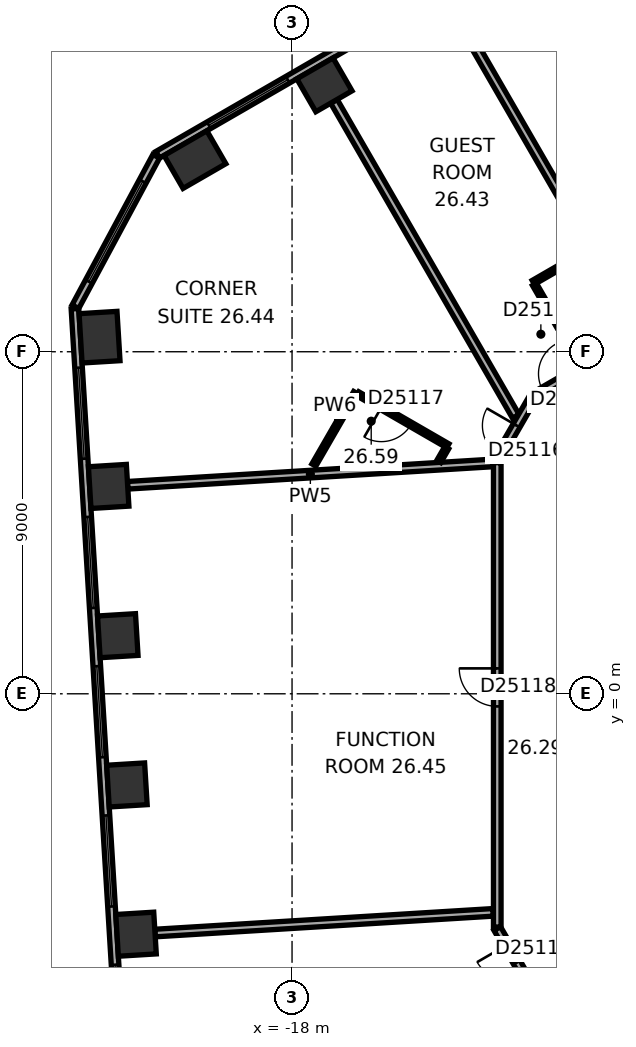
"""IFC4 building model, lengths in metres.
Left out: names, types, materials, properties, quantities, classifications, styles, units other than length and angle.
Written with IfcOpenShell. Run it as: python <this file> out.ifc"""

import sys

from ifc_helpers import new_model, si_unit, direction, frame, frame_2d, origin, origin_2d, place, context, subcontext, project, spatial, rectangle, extrude, element, fill, save


model = new_model("IFC4")
c1 = context("Model", 3, precision=1e-05, world=origin(), true_north=direction((0.0, 1.0)))
c2 = subcontext(c1, "Body", "Model", "MODEL_VIEW")
j1 = project(units=[si_unit("LENGTHUNIT", "METRE"), si_unit("PLANEANGLEUNIT", "RADIAN")], contexts=[c1])
p1 = place(None, origin())
s1 = spatial("IfcSite", under=j1, at=p1, CompositionType="ELEMENT")
p2 = place(p1, origin())
s2 = spatial("IfcBuilding", under=s1, at=p2, CompositionType="ELEMENT")
p3 = place(p2, frame((0.0, 0.0, 110.0)))
s3 = spatial("IfcBuildingStorey", under=s2, at=p3, CompositionType="ELEMENT", Elevation=110.0)
p4 = place(p3, frame((-17.148, 16.023, 0.0), z_axis=(0.0, 0.0, 1.0), x_axis=(-0.866025403784, -0.5, 0.0)))
e1 = element("IfcColumn", 1, at=p4, inside=s3, PredefinedType="COLUMN", context=c2, shape_type="SweptSolid", body=[
    extrude(rectangle(XDim=1.1, YDim=1.0, at=origin_2d()), origin(), (0.0, 0.0, 1.0), 3.3),
])
for number, where, z_axis, x_axis in (
    (2, (-20.555, 14.055, 0.0), (0.0, 0.0, 1.0), (-0.866, -0.5, 0.0)),
    (3, (-23.066, 9.383, 0.0), (0.0, 0.0, 1.0), (0.061, -0.998, 0.0)),
):
    element("IfcColumn", number, at=place(p3, frame(where, z_axis=z_axis, x_axis=x_axis)), inside=s3, PredefinedType="COLUMN", context=c2, shape_type="SweptSolid", body=[
        extrude(rectangle(XDim=1.3, YDim=1.0, at=origin_2d()), origin(), (0.0, 0.0, 1.0), 3.3),
    ])
for number, where, z_axis, x_axis in (
    (4, (-22.826, 5.456, 0.0), (0.0, 0.0, 1.0), (0.061, -0.998, 0.0)),
    (5, (-22.585, 1.529, 0.0), (0.0, 0.0, 1.0), (0.061, -0.998, 0.0)),
    (6, (-22.345, -2.399, 0.0), (0.0, 0.0, 1.0), (0.061, -0.998, 0.0)),
    (7, (-22.105, -6.326, 0.0), (0.0, 0.0, 1.0), (0.061, -0.998, 0.0)),
):
    element("IfcColumn", number, at=place(p3, frame(where, z_axis=z_axis, x_axis=x_axis)), inside=s3, PredefinedType="COLUMN", context=c2, shape_type="SweptSolid", body=[
        extrude(rectangle(XDim=1.1, YDim=1.0, at=origin_2d()), origin(), (0.0, 0.0, 1.0), 3.3),
    ])
p5 = place(p3, frame((-3.136, 24.805, 0.0), z_axis=(0.0, 0.0, 1.0), x_axis=(-0.866028291626, -0.499994998079, 0.0)))
e8 = element("IfcWall", 8, at=p5, inside=s3, PredefinedType="STANDARD", context=c2, shape_type="SweptSolid", body=[
    extrude(rectangle(XDim=21.246, YDim=0.2, at=frame_2d((10.623, 0.0))), origin(), (0.0, 0.0, 1.0), 3.3),
])
p6 = place(p5, frame((1.555, 0.0, 0.8)))
e9 = element("IfcOpeningElement", 9, at=p6, cuts=e8, PredefinedType="OPENING", context=c2, shape_type="SweptSolid", body=[
    extrude(rectangle(XDim=2.4, YDim=1.7, at=frame_2d((1.2, 0.85))), frame((0.0, 0.11, 0.0), z_axis=(0.0, -1.0, 0.0), x_axis=(1.0, 0.0, 0.0)), (0.0, 0.0, 1.0), 0.22),
])
p7 = place(p5, frame((5.489, 0.0, 0.8)))
e10 = element("IfcOpeningElement", 10, at=p7, cuts=e8, PredefinedType="OPENING", context=c2, shape_type="SweptSolid", body=[
    extrude(rectangle(XDim=2.4, YDim=1.7, at=frame_2d((1.2, 0.85))), frame((0.0, 0.11, 0.0), z_axis=(0.0, -1.0, 0.0), x_axis=(1.0, 0.0, 0.0)), (0.0, 0.0, 1.0), 0.22),
])
p8 = place(p5, frame((9.424, 0.0, 0.8)))
e11 = element("IfcOpeningElement", 11, at=p8, cuts=e8, PredefinedType="OPENING", context=c2, shape_type="SweptSolid", body=[
    extrude(rectangle(XDim=2.4, YDim=1.7, at=frame_2d((1.2, 0.85))), frame((0.0, 0.11, 0.0), z_axis=(0.0, -1.0, 0.0), x_axis=(1.0, 0.0, 0.0)), (0.0, 0.0, 1.0), 0.22),
])
p9 = place(p5, frame((13.358, 0.0, 0.8)))
e12 = element("IfcOpeningElement", 12, at=p9, cuts=e8, PredefinedType="OPENING", context=c2, shape_type="SweptSolid", body=[
    extrude(rectangle(XDim=2.4, YDim=1.7, at=frame_2d((1.2, 0.85))), frame((0.0, 0.11, 0.0), z_axis=(0.0, -1.0, 0.0), x_axis=(1.0, 0.0, 0.0)), (0.0, 0.0, 1.0), 0.22),
])
p10 = place(p5, frame((17.293, 0.0, 0.8)))
e13 = element("IfcOpeningElement", 13, at=p10, cuts=e8, PredefinedType="OPENING", context=c2, shape_type="SweptSolid", body=[
    extrude(rectangle(XDim=2.4, YDim=1.7, at=frame_2d((1.2, 0.85))), frame((0.0, 0.11, 0.0), z_axis=(0.0, -1.0, 0.0), x_axis=(1.0, 0.0, 0.0)), (0.0, 0.0, 1.0), 0.22),
])
p11 = place(p3, frame((-21.574, 14.143, 0.0), z_axis=(0.0, 0.0, 1.0), x_axis=(-0.473292949472, -0.880905093628, 0.0)))
e14 = element("IfcWall", 14, at=p11, inside=s3, PredefinedType="STANDARD", context=c2, shape_type="SweptSolid", body=[
    extrude(rectangle(XDim=4.494, YDim=0.2, at=frame_2d((2.247, 0.0))), origin(), (0.0, 0.0, 1.0), 3.3),
])
p12 = place(p11, frame((0.747, 0.0, 0.8)))
e15 = element("IfcOpeningElement", 15, at=p12, cuts=e14, PredefinedType="OPENING", context=c2, shape_type="SweptSolid", body=[
    extrude(rectangle(XDim=3.0, YDim=1.7, at=frame_2d((1.5, 0.85))), frame((0.0, 0.11, 0.0), z_axis=(0.0, -1.0, 0.0), x_axis=(1.0, 0.0, 0.0)), (0.0, 0.0, 1.0), 0.22),
])
p13 = place(p3, frame((-23.713, 10.131, 0.0), z_axis=(0.0, 0.0, 1.0), x_axis=(0.061040439785, -0.998135293791, 0.0)))
e16 = element("IfcWall", 16, at=p13, inside=s3, PredefinedType="STANDARD", context=c2, shape_type="SweptSolid", body=[
    extrude(rectangle(XDim=21.246, YDim=0.2, at=frame_2d((10.623, 0.0))), origin(), (0.0, 0.0, 1.0), 3.3),
])
p14 = place(p13, frame((1.553, 0.0, 0.8)))
e17 = element("IfcOpeningElement", 17, at=p14, cuts=e16, PredefinedType="OPENING", context=c2, shape_type="SweptSolid", body=[
    extrude(rectangle(XDim=2.4, YDim=1.7, at=frame_2d((1.2, 0.85))), frame((0.0, 0.11, 0.0), z_axis=(0.0, -1.0, 0.0), x_axis=(1.0, 0.0, 0.0)), (0.0, 0.0, 1.0), 0.22),
])
p15 = place(p13, frame((5.488, 0.0, 0.8)))
e18 = element("IfcOpeningElement", 18, at=p15, cuts=e16, PredefinedType="OPENING", context=c2, shape_type="SweptSolid", body=[
    extrude(rectangle(XDim=2.4, YDim=1.7, at=frame_2d((1.2, 0.85))), frame((0.0, 0.11, 0.0), z_axis=(0.0, -1.0, 0.0), x_axis=(1.0, 0.0, 0.0)), (0.0, 0.0, 1.0), 0.22),
])
p16 = place(p13, frame((9.422, 0.0, 0.8)))
e19 = element("IfcOpeningElement", 19, at=p16, cuts=e16, PredefinedType="OPENING", context=c2, shape_type="SweptSolid", body=[
    extrude(rectangle(XDim=2.4, YDim=1.7, at=frame_2d((1.2, 0.85))), frame((0.0, 0.11, 0.0), z_axis=(0.0, -1.0, 0.0), x_axis=(1.0, 0.0, 0.0)), (0.0, 0.0, 1.0), 0.22),
])
p17 = place(p13, frame((13.357, 0.0, 0.8)))
e20 = element("IfcOpeningElement", 20, at=p17, cuts=e16, PredefinedType="OPENING", context=c2, shape_type="SweptSolid", body=[
    extrude(rectangle(XDim=2.4, YDim=1.7, at=frame_2d((1.2, 0.85))), frame((0.0, 0.11, 0.0), z_axis=(0.0, -1.0, 0.0), x_axis=(1.0, 0.0, 0.0)), (0.0, 0.0, 1.0), 0.22),
])
p18 = place(p13, frame((17.292, 0.0, 0.8)))
e21 = element("IfcOpeningElement", 21, at=p18, cuts=e16, PredefinedType="OPENING", context=c2, shape_type="SweptSolid", body=[
    extrude(rectangle(XDim=2.4, YDim=1.7, at=frame_2d((1.2, 0.85))), frame((0.0, 0.11, 0.0), z_axis=(0.0, -1.0, 0.0), x_axis=(1.0, 0.0, 0.0)), (0.0, 0.0, 1.0), 0.22),
])
p19 = place(p3, frame((-22.327, 5.486, 0.0), z_axis=(0.0, 0.0, 1.0), x_axis=(0.998135194863, 0.061042057435, 0.0)))
e22 = element("IfcWall", 22, at=p19, inside=s3, PredefinedType="PARTITIONING", context=c2, shape_type="SweptSolid", body=[
    extrude(rectangle(XDim=9.635, YDim=0.2, at=frame_2d((4.817, 0.0))), origin(), (0.0, 0.0, 1.0), 3.05),
])
p20 = place(p3, frame((-21.606, -6.295, 0.0), z_axis=(0.0, 0.0, 1.0), x_axis=(0.998134305525, 0.061056597794, 0.0)))
e23 = element("IfcWall", 23, at=p20, inside=s3, PredefinedType="PARTITIONING", context=c2, shape_type="SweptSolid", body=[
    extrude(rectangle(XDim=8.913, YDim=0.2, at=frame_2d((4.457, 0.0))), origin(), (0.0, 0.0, 1.0), 2.6),
])
p21 = place(p3, frame((-17.426, 6.019, 0.0), z_axis=(0.0, 0.0, 1.0), x_axis=(0.50002983664, 0.866008176907, 0.0)))
e24 = element("IfcWall", 24, at=p21, inside=s3, PredefinedType="PARTITIONING", context=c2, shape_type="SweptSolid", body=[
    extrude(rectangle(XDim=2.2, YDim=0.12, at=frame_2d((1.1, 0.0))), origin(), (0.0, 0.0, 1.0), 3.05),
])
p22 = place(p3, frame((-16.898, 15.59, 0.0), z_axis=(0.0, 0.0, 1.0), x_axis=(0.500023458698, -0.866011859475, 0.0)))
e25 = element("IfcWall", 25, at=p22, inside=s3, PredefinedType="PARTITIONING", context=c2, shape_type="SweptSolid", body=[
    extrude(rectangle(XDim=9.572, YDim=0.2, at=frame_2d((4.786, 0.0))), origin(), (0.0, 0.0, 1.0), 3.05),
])
p23 = place(p3, frame((-16.274, 7.895, 0.0), z_axis=(0.0, 0.0, 1.0), x_axis=(0.865997131366, -0.500048966069, 0.0)))
e26 = element("IfcWall", 26, at=p23, inside=s3, PredefinedType="PARTITIONING", context=c2, shape_type="SweptSolid", body=[
    extrude(rectangle(XDim=2.74, YDim=0.12, at=frame_2d((1.37, 0.0))), origin(), (0.0, 0.0, 1.0), 3.05),
])
p24 = place(p23, frame((0.72, 0.0, 0.0)))
e27 = element("IfcOpeningElement", 27, at=p24, cuts=e26, PredefinedType="OPENING", context=c2, shape_type="SweptSolid", body=[
    extrude(rectangle(XDim=0.9, YDim=2.1, at=frame_2d((0.45, 1.05))), frame((0.0, 0.07, 0.0), z_axis=(0.0, -1.0, 0.0), x_axis=(1.0, 0.0, 0.0)), (0.0, 0.0, 1.0), 0.14),
])
p25 = place(p3, frame((-13.931, 6.472, 0.0), z_axis=(0.0, 0.0, 1.0), x_axis=(-0.499739399214, -0.866175809448, 0.0)))
e28 = element("IfcWall", 28, at=p25, inside=s3, PredefinedType="PARTITIONING", context=c2, shape_type="SweptSolid", body=[
    extrude(rectangle(XDim=0.416, YDim=0.12, at=frame_2d((0.208, 0.0))), origin(), (0.0, 0.0, 1.0), 3.05),
])
p26 = place(p3, frame((-12.6, -6.177, 0.0), z_axis=(0.0, 0.0, 1.0), x_axis=(0.500063520245, -0.865988727248, 0.0)))
e29 = element("IfcWall", 29, at=p26, inside=s3, PredefinedType="PARTITIONING", context=c2, shape_type="SweptSolid", body=[
    extrude(rectangle(XDim=1.9, YDim=0.2, at=frame_2d((0.95, 0.0))), origin(), (0.0, 0.0, 1.0), 3.05),
])
p27 = place(p26, frame((0.5, 0.0, 0.0)))
e30 = element("IfcOpeningElement", 30, at=p27, cuts=e29, PredefinedType="OPENING", context=c2, shape_type="SweptSolid", body=[
    extrude(rectangle(XDim=0.9, YDim=2.1, at=frame_2d((0.45, 1.05))), frame((0.0, 0.11, 0.0), z_axis=(0.0, -1.0, 0.0), x_axis=(1.0, 0.0, 0.0)), (0.0, 0.0, 1.0), 0.22),
])
p28 = place(p3, frame((-12.6, 6.081, 0.0), z_axis=(0.0, 0.0, 1.0), x_axis=(0.0, -1.0, 0.0)))
e31 = element("IfcWall", 31, at=p28, inside=s3, PredefinedType="PARTITIONING", context=c2, shape_type="SweptSolid", body=[
    extrude(rectangle(XDim=12.219, YDim=0.2, at=frame_2d((6.109, 0.0))), origin(), (0.0, 0.0, 1.0), 3.05),
])
p29 = place(p28, frame((5.413, 0.0, 0.0)))
e32 = element("IfcOpeningElement", 32, at=p29, cuts=e31, PredefinedType="OPENING", context=c2, shape_type="SweptSolid", body=[
    extrude(rectangle(XDim=1.0, YDim=2.1, at=frame_2d((0.5, 1.05))), frame((0.0, 0.11, 0.0), z_axis=(0.0, -1.0, 0.0), x_axis=(1.0, 0.0, 0.0)), (0.0, 0.0, 1.0), 0.22),
])
p30 = place(p3, frame((-11.65, 7.823, 0.0), z_axis=(0.0, 0.0, 1.0), x_axis=(-0.500063520245, -0.865988727248, 0.0)))
e33 = element("IfcWall", 33, at=p30, inside=s3, PredefinedType="PARTITIONING", context=c2, shape_type="SweptSolid", body=[
    extrude(rectangle(XDim=1.9, YDim=0.2, at=frame_2d((0.95, 0.0))), origin(), (0.0, 0.0, 1.0), 3.05),
])
p31 = place(p30, frame((0.882, 0.0, 0.0)))
e34 = element("IfcOpeningElement", 34, at=p31, cuts=e33, PredefinedType="OPENING", context=c2, shape_type="SweptSolid", body=[
    extrude(rectangle(XDim=0.9, YDim=2.1, at=frame_2d((0.45, 1.05))), frame((0.0, 0.11, 0.0), z_axis=(0.0, -1.0, 0.0), x_axis=(1.0, 0.0, 0.0)), (0.0, 0.0, 1.0), 0.22),
])
p32 = place(p3, frame((-11.651, 10.825, 0.0), z_axis=(0.0, 0.0, 1.0), x_axis=(0.865998477143, 0.500046635412, 0.0)))
e35 = element("IfcWall", 35, at=p32, inside=s3, PredefinedType="PARTITIONING", context=c2, shape_type="SweptSolid", body=[
    extrude(rectangle(XDim=1.673, YDim=0.12, at=frame_2d((0.836, 0.0))), origin(), (0.0, 0.0, 1.0), 3.05),
])
p33 = place(p3, frame((-10.401, 8.66, 0.0), z_axis=(0.0, 0.0, 1.0), x_axis=(-0.500077547548, 0.865980627057, 0.0)))
e36 = element("IfcWall", 36, at=p33, inside=s3, PredefinedType="PARTITIONING", context=c2, shape_type="SweptSolid", body=[
    extrude(rectangle(XDim=2.44, YDim=0.12, at=frame_2d((1.22, 0.0))), origin(), (0.0, 0.0, 1.0), 3.05),
])
p34 = place(p33, frame((0.77, 0.0, 0.0)))
e37 = element("IfcOpeningElement", 37, at=p34, cuts=e36, PredefinedType="OPENING", context=c2, shape_type="SweptSolid", body=[
    extrude(rectangle(XDim=0.9, YDim=2.1, at=frame_2d((0.45, 1.05))), frame((0.0, 0.07, 0.0), z_axis=(0.0, -1.0, 0.0), x_axis=(1.0, 0.0, 0.0)), (0.0, 0.0, 1.0), 0.14),
])
p35 = place(p3, frame((-8.902, 9.41, 0.0), z_axis=(0.0, 0.0, 1.0), x_axis=(-0.866014299198, -0.500019233215, 0.0)))
e38 = element("IfcWall", 38, at=p35, inside=s3, PredefinedType="PARTITIONING", context=c2, shape_type="SweptSolid", body=[
    extrude(rectangle(XDim=3.133, YDim=0.2, at=frame_2d((1.567, 0.0))), origin(), (0.0, 0.0, 1.0), 3.05),
])
p36 = place(p35, frame((1.978, 0.0, 0.0)))
e39 = element("IfcOpeningElement", 39, at=p36, cuts=e38, PredefinedType="OPENING", context=c2, shape_type="SweptSolid", body=[
    extrude(rectangle(XDim=0.9, YDim=2.1, at=frame_2d((0.45, 1.05))), frame((0.0, 0.11, 0.0), z_axis=(0.0, -1.0, 0.0), x_axis=(1.0, 0.0, 0.0)), (0.0, 0.0, 1.0), 0.22),
])
p37 = place(p3, frame((-7.865, 7.814, 0.0), z_axis=(0.0, 0.0, 1.0), x_axis=(-0.500004234368, 0.866022959057, 0.0)))
e40 = element("IfcWall", 40, at=p37, inside=s3, PredefinedType="PARTITIONING", context=c2, shape_type="SweptSolid", body=[
    extrude(rectangle(XDim=11.25, YDim=0.2, at=frame_2d((5.625, 0.0))), origin(), (0.0, 0.0, 1.0), 3.05),
])
p38 = place(p37, frame((0.5, 0.0, 0.0)))
e41 = element("IfcOpeningElement", 41, at=p38, cuts=e40, PredefinedType="OPENING", context=c2, shape_type="SweptSolid", body=[
    extrude(rectangle(XDim=0.9, YDim=2.1, at=frame_2d((0.45, 1.05))), frame((0.0, 0.11, 0.0), z_axis=(0.0, -1.0, 0.0), x_axis=(1.0, 0.0, 0.0)), (0.0, 0.0, 1.0), 0.22),
])
p39 = place(p10, origin())
e42 = element("IfcWindow", 42, at=p39, inside=s3, PartitioningType="SINGLE_PANEL", PredefinedType="WINDOW", context=c2, shape_type="SweptSolid", body=[
    extrude(rectangle(XDim=2.4, YDim=1.7, at=frame_2d((1.2, 0.85))), frame((0.0, 0.03, 0.0), z_axis=(0.0, -1.0, 0.0), x_axis=(1.0, 0.0, 0.0)), (0.0, 0.0, 1.0), 0.06),
])
fill(e13, e42)
p40 = place(p12, origin())
e43 = element("IfcWindow", 43, at=p40, inside=s3, PartitioningType="SINGLE_PANEL", PredefinedType="WINDOW", context=c2, shape_type="SweptSolid", body=[
    extrude(rectangle(XDim=3.0, YDim=1.7, at=frame_2d((1.5, 0.85))), frame((0.0, 0.03, 0.0), z_axis=(0.0, -1.0, 0.0), x_axis=(1.0, 0.0, 0.0)), (0.0, 0.0, 1.0), 0.06),
])
fill(e15, e43)
p41 = place(p14, origin())
e44 = element("IfcWindow", 44, at=p41, inside=s3, PartitioningType="SINGLE_PANEL", PredefinedType="WINDOW", context=c2, shape_type="SweptSolid", body=[
    extrude(rectangle(XDim=2.4, YDim=1.7, at=frame_2d((1.2, 0.85))), frame((0.0, 0.03, 0.0), z_axis=(0.0, -1.0, 0.0), x_axis=(1.0, 0.0, 0.0)), (0.0, 0.0, 1.0), 0.06),
])
fill(e17, e44)
p42 = place(p15, origin())
e45 = element("IfcWindow", 45, at=p42, inside=s3, PartitioningType="SINGLE_PANEL", PredefinedType="WINDOW", context=c2, shape_type="SweptSolid", body=[
    extrude(rectangle(XDim=2.4, YDim=1.7, at=frame_2d((1.2, 0.85))), frame((0.0, 0.03, 0.0), z_axis=(0.0, -1.0, 0.0), x_axis=(1.0, 0.0, 0.0)), (0.0, 0.0, 1.0), 0.06),
])
fill(e18, e45)
p43 = place(p16, origin())
e46 = element("IfcWindow", 46, at=p43, inside=s3, PartitioningType="SINGLE_PANEL", PredefinedType="WINDOW", context=c2, shape_type="SweptSolid", body=[
    extrude(rectangle(XDim=2.4, YDim=1.7, at=frame_2d((1.2, 0.85))), frame((0.0, 0.03, 0.0), z_axis=(0.0, -1.0, 0.0), x_axis=(1.0, 0.0, 0.0)), (0.0, 0.0, 1.0), 0.06),
])
fill(e19, e46)
p44 = place(p17, origin())
e47 = element("IfcWindow", 47, at=p44, inside=s3, PartitioningType="SINGLE_PANEL", PredefinedType="WINDOW", context=c2, shape_type="SweptSolid", body=[
    extrude(rectangle(XDim=2.4, YDim=1.7, at=frame_2d((1.2, 0.85))), frame((0.0, 0.03, 0.0), z_axis=(0.0, -1.0, 0.0), x_axis=(1.0, 0.0, 0.0)), (0.0, 0.0, 1.0), 0.06),
])
fill(e20, e47)
p45 = place(p18, origin())
e48 = element("IfcWindow", 48, at=p45, inside=s3, PartitioningType="SINGLE_PANEL", PredefinedType="WINDOW", context=c2, shape_type="SweptSolid", body=[
    extrude(rectangle(XDim=2.4, YDim=1.7, at=frame_2d((1.2, 0.85))), frame((0.0, 0.03, 0.0), z_axis=(0.0, -1.0, 0.0), x_axis=(1.0, 0.0, 0.0)), (0.0, 0.0, 1.0), 0.06),
])
fill(e21, e48)
p46 = place(p36, origin())
e49 = element("IfcDoor", 49, at=p46, inside=s3, OperationType="SINGLE_SWING_LEFT", PredefinedType="DOOR", context=c2, shape_type="SweptSolid", body=[
    extrude(rectangle(XDim=0.9, YDim=2.1, at=frame_2d((0.45, 1.05))), frame((0.0, 0.025, 0.0), z_axis=(0.0, -1.0, 0.0), x_axis=(1.0, 0.0, 0.0)), (0.0, 0.0, 1.0), 0.05),
])
fill(e39, e49)
p47 = place(p34, origin())
e50 = element("IfcDoor", 50, at=p47, inside=s3, OperationType="SINGLE_SWING_LEFT", PredefinedType="DOOR", context=c2, shape_type="SweptSolid", body=[
    extrude(rectangle(XDim=0.9, YDim=2.1, at=frame_2d((0.45, 1.05))), frame((0.0, 0.025, 0.0), z_axis=(0.0, -1.0, 0.0), x_axis=(1.0, 0.0, 0.0)), (0.0, 0.0, 1.0), 0.05),
])
fill(e37, e50)
p48 = place(p31, origin())
e51 = element("IfcDoor", 51, at=p48, inside=s3, OperationType="SINGLE_SWING_LEFT", PredefinedType="DOOR", context=c2, shape_type="SweptSolid", body=[
    extrude(rectangle(XDim=0.9, YDim=2.1, at=frame_2d((0.45, 1.05))), frame((0.0, 0.025, 0.0), z_axis=(0.0, -1.0, 0.0), x_axis=(1.0, 0.0, 0.0)), (0.0, 0.0, 1.0), 0.05),
])
fill(e34, e51)
p49 = place(p24, origin())
e52 = element("IfcDoor", 52, at=p49, inside=s3, OperationType="SINGLE_SWING_LEFT", PredefinedType="DOOR", context=c2, shape_type="SweptSolid", body=[
    extrude(rectangle(XDim=0.9, YDim=2.1, at=frame_2d((0.45, 1.05))), frame((0.0, 0.025, 0.0), z_axis=(0.0, -1.0, 0.0), x_axis=(1.0, 0.0, 0.0)), (0.0, 0.0, 1.0), 0.05),
])
fill(e27, e52)
p50 = place(p29, origin())
e53 = element("IfcDoor", 53, at=p50, inside=s3, OperationType="SINGLE_SWING_LEFT", PredefinedType="DOOR", context=c2, shape_type="SweptSolid", body=[
    extrude(rectangle(XDim=1.0, YDim=2.1, at=frame_2d((0.5, 1.05))), frame((0.0, 0.025, 0.0), z_axis=(0.0, -1.0, 0.0), x_axis=(1.0, 0.0, 0.0)), (0.0, 0.0, 1.0), 0.05),
])
fill(e32, e53)
p51 = place(p27, origin())
e54 = element("IfcDoor", 54, at=p51, inside=s3, OperationType="SINGLE_SWING_LEFT", PredefinedType="DOOR", context=c2, shape_type="SweptSolid", body=[
    extrude(rectangle(XDim=0.9, YDim=2.1, at=frame_2d((0.45, 1.05))), frame((0.0, 0.025, 0.0), z_axis=(0.0, -1.0, 0.0), x_axis=(1.0, 0.0, 0.0)), (0.0, 0.0, 1.0), 0.05),
])
fill(e30, e54)
save(model, sys.argv[1])
